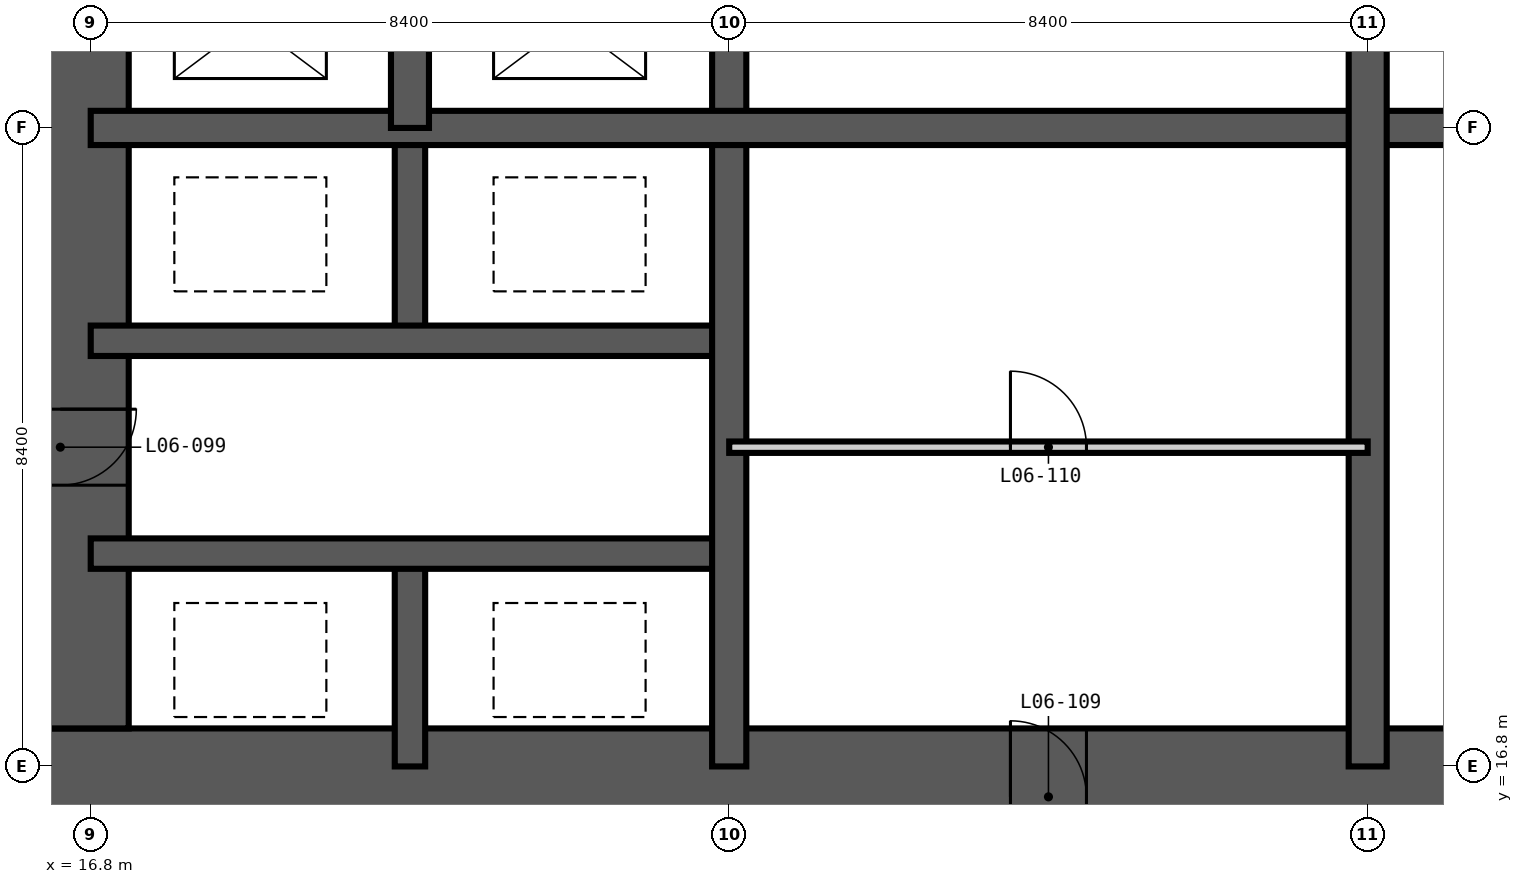
"""IFC4 building model, lengths in metres.
Left out: names, types, materials, properties, quantities, classifications, styles, units other than length and angle.
Written with IfcOpenShell. Run it as: python <this file> out.ifc"""

import sys

from ifc_helpers import new_model, si_unit, direction, frame, frame_2d, origin, place, context, subcontext, project, spatial, rectangle, extrude, element, fill, save


model = new_model("IFC4")
c1 = context("Model", 3, precision=1e-05, world=origin(), true_north=direction((0.0, 1.0)))
c2 = subcontext(c1, "Body", "Model", "MODEL_VIEW")
j1 = project(units=[si_unit("LENGTHUNIT", "METRE"), si_unit("PLANEANGLEUNIT", "RADIAN")], contexts=[c1])
p1 = place(None, origin())
s1 = spatial("IfcSite", under=j1, at=p1, CompositionType="ELEMENT")
p2 = place(p1, origin())
s2 = spatial("IfcBuilding", under=s1, at=p2, CompositionType="ELEMENT")
p3 = place(p2, frame((0.0, 0.0, 30.6)))
s3 = spatial("IfcBuildingStorey", under=s2, at=p3, CompositionType="ELEMENT", Elevation=30.6)
p4 = place(p3, frame((15.5, 16.4, -0.35), z_axis=(0.0, 0.0, 1.0), x_axis=(1.0, 0.0, 0.0)))
e1 = element("IfcWall", 1, at=p4, inside=s3, PredefinedType="SHEAR", context=c2, shape_type="SweptSolid", body=[
    extrude(rectangle(XDim=27.8, YDim=1.8, at=frame_2d((13.9, 0.0))), origin(), (0.0, 0.0, 1.0), 3.6),
])
p5 = place(p4, frame((13.4, 0.0, 0.35)))
e2 = element("IfcOpeningElement", 2, at=p5, cuts=e1, PredefinedType="OPENING", context=c2, shape_type="SweptSolid", body=[
    extrude(rectangle(XDim=1.0, YDim=2.1, at=frame_2d((0.5, 1.05))), frame((0.0, 0.91, 0.0), z_axis=(0.0, -1.0, 0.0), x_axis=(1.0, 0.0, 0.0)), (0.0, 0.0, 1.0), 1.82),
])
p6 = place(p4, frame((19.7, 0.0, 0.35)))
e3 = element("IfcOpeningElement", 3, at=p6, cuts=e1, PredefinedType="OPENING", context=c2, shape_type="SweptSolid", body=[
    extrude(rectangle(XDim=1.0, YDim=2.1, at=frame_2d((0.5, 1.05))), frame((0.0, 0.91, 0.0), z_axis=(0.0, -1.0, 0.0), x_axis=(1.0, 0.0, 0.0)), (0.0, 0.0, 1.0), 1.82),
])
p7 = place(p3, frame((16.4, 41.5, -0.35), z_axis=(0.0, 0.0, 1.0), x_axis=(0.0, -1.0, 0.0)))
e4 = element("IfcWall", 4, at=p7, inside=s3, PredefinedType="SHEAR", context=c2, shape_type="SweptSolid", body=[
    extrude(rectangle(XDim=24.2, YDim=1.8, at=frame_2d((12.1, 0.0))), origin(), (0.0, 0.0, 1.0), 3.6),
])
p8 = place(p7, frame((11.2, 0.0, 0.35)))
e5 = element("IfcOpeningElement", 5, at=p8, cuts=e4, PredefinedType="OPENING", context=c2, shape_type="SweptSolid", body=[
    extrude(rectangle(XDim=1.8, YDim=2.2, at=frame_2d((0.9, 1.1))), frame((0.0, 0.91, 0.0), z_axis=(0.0, -1.0, 0.0), x_axis=(1.0, 0.0, 0.0)), (0.0, 0.0, 1.0), 1.82),
])
p9 = place(p7, frame((20.0, 0.0, 0.35)))
e6 = element("IfcOpeningElement", 6, at=p9, cuts=e4, PredefinedType="OPENING", context=c2, shape_type="SweptSolid", body=[
    extrude(rectangle(XDim=1.0, YDim=2.1, at=frame_2d((0.5, 1.05))), frame((0.0, 0.91, 0.0), z_axis=(0.0, -1.0, 0.0), x_axis=(1.0, 0.0, 0.0)), (0.0, 0.0, 1.0), 1.82),
])
p10 = place(p7, frame((5.3, 0.0, 0.35)))
e7 = element("IfcOpeningElement", 7, at=p10, cuts=e4, PredefinedType="OPENING", context=c2, shape_type="SweptSolid", body=[
    extrude(rectangle(XDim=1.0, YDim=2.1, at=frame_2d((0.5, 1.05))), frame((0.0, 0.91, 0.0), z_axis=(0.0, -1.0, 0.0), x_axis=(1.0, 0.0, 0.0)), (0.0, 0.0, 1.0), 1.82),
])
for number, where, z_axis, x_axis in (
    (8, (21.0, 16.8, -0.35), (0.0, 0.0, 1.0), (0.0, 1.0, 0.0)),
    (9, (21.0, 22.4, -0.35), (0.0, 0.0, 1.0), (0.0, 1.0, 0.0)),
):
    element("IfcWall", number, at=place(p3, frame(where, z_axis=z_axis, x_axis=x_axis)), inside=s3, PredefinedType="SHEAR", context=c2, shape_type="SweptSolid", body=[
        extrude(rectangle(XDim=2.8, YDim=0.4, at=frame_2d((1.4, 0.0))), origin(), (0.0, 0.0, 1.0), 3.6),
    ])
for number, where, z_axis, x_axis in (
    (10, (16.8, 19.6, -0.35), (0.0, 0.0, 1.0), (1.0, 0.0, 0.0)),
    (11, (16.8, 22.4, -0.35), (0.0, 0.0, 1.0), (1.0, 0.0, 0.0)),
):
    element("IfcWall", number, at=place(p3, frame(where, z_axis=z_axis, x_axis=x_axis)), inside=s3, PredefinedType="SHEAR", context=c2, shape_type="SweptSolid", body=[
        extrude(rectangle(XDim=8.4, YDim=0.4, at=frame_2d((4.2, 0.0))), origin(), (0.0, 0.0, 1.0), 3.6),
    ])
for number, where, z_axis, x_axis in (
    (12, (25.2, 16.8, -0.35), (0.0, 0.0, 1.0), (0.0, 1.0, 0.0)),
    (13, (16.8, 25.2, -0.35), (0.0, 0.0, 1.0), (1.0, 0.0, 0.0)),
):
    element("IfcWall", number, at=place(p3, frame(where, z_axis=z_axis, x_axis=x_axis)), inside=s3, PredefinedType="SHEAR", context=c2, shape_type="SweptSolid", body=[
        extrude(rectangle(XDim=25.2, YDim=0.45, at=frame_2d((12.6, 0.0))), origin(), (0.0, 0.0, 1.0), 3.6),
    ])
p11 = place(p3, frame((21.0, 25.2, -0.35), z_axis=(0.0, 0.0, 1.0), x_axis=(0.0, 1.0, 0.0)))
e14 = element("IfcWall", 14, at=p11, inside=s3, PredefinedType="SHEAR", context=c2, shape_type="SweptSolid", body=[
    extrude(rectangle(XDim=2.8, YDim=0.5, at=frame_2d((1.4, 0.0))), origin(), (0.0, 0.0, 1.0), 3.6),
])
p12 = place(p3, frame((33.6, 16.8, -0.35), z_axis=(0.0, 0.0, 1.0), x_axis=(0.0, 1.0, 0.0)))
e15 = element("IfcWall", 15, at=p12, inside=s3, PredefinedType="SHEAR", context=c2, shape_type="SweptSolid", body=[
    extrude(rectangle(XDim=25.2, YDim=0.5, at=frame_2d((12.6, 0.0))), origin(), (0.0, 0.0, 1.0), 3.6),
])
p13 = place(p12, frame((22.5, 0.0, 0.35)))
e16 = element("IfcOpeningElement", 16, at=p13, cuts=e15, PredefinedType="OPENING", context=c2, shape_type="SweptSolid", body=[
    extrude(rectangle(XDim=1.2, YDim=2.2, at=frame_2d((0.6, 1.1))), frame((0.0, 0.26, 0.0), z_axis=(0.0, -1.0, 0.0), x_axis=(1.0, 0.0, 0.0)), (0.0, 0.0, 1.0), 0.52),
])
p14 = place(p12, frame((18.3, 0.0, 0.35)))
e17 = element("IfcOpeningElement", 17, at=p14, cuts=e15, PredefinedType="OPENING", context=c2, shape_type="SweptSolid", body=[
    extrude(rectangle(XDim=1.2, YDim=2.2, at=frame_2d((0.6, 1.1))), frame((0.0, 0.26, 0.0), z_axis=(0.0, -1.0, 0.0), x_axis=(1.0, 0.0, 0.0)), (0.0, 0.0, 1.0), 0.52),
])
p15 = place(p12, frame((12.1, 0.0, 0.35)))
e18 = element("IfcOpeningElement", 18, at=p15, cuts=e15, PredefinedType="OPENING", context=c2, shape_type="SweptSolid", body=[
    extrude(rectangle(XDim=1.0, YDim=2.1, at=frame_2d((0.5, 1.05))), frame((0.0, 0.26, 0.0), z_axis=(0.0, -1.0, 0.0), x_axis=(1.0, 0.0, 0.0)), (0.0, 0.0, 1.0), 0.52),
])
p16 = place(p3, frame((25.2, 21.0, 0.0), z_axis=(0.0, 0.0, 1.0), x_axis=(1.0, 0.0, 0.0)))
e19 = element("IfcWall", 19, at=p16, inside=s3, PredefinedType="PARTITIONING", context=c2, shape_type="SweptSolid", body=[
    extrude(rectangle(XDim=8.4, YDim=0.15, at=frame_2d((4.2, 0.0))), origin(), (0.0, 0.0, 1.0), 3.25),
])
p17 = place(p16, frame((3.7, 0.0, 0.0)))
e20 = element("IfcOpeningElement", 20, at=p17, cuts=e19, PredefinedType="OPENING", context=c2, shape_type="SweptSolid", body=[
    extrude(rectangle(XDim=1.0, YDim=2.1, at=frame_2d((0.5, 1.05))), frame((0.0, 0.085, 0.0), z_axis=(0.0, -1.0, 0.0), x_axis=(1.0, 0.0, 0.0)), (0.0, 0.0, 1.0), 0.17),
])
p18 = place(p9, origin())
e21 = element("IfcDoor", 21, at=p18, inside=s3, OperationType="SINGLE_SWING_LEFT", PredefinedType="DOOR", context=c2, shape_type="SweptSolid", body=[
    extrude(rectangle(XDim=1.0, YDim=2.1, at=frame_2d((0.5, 1.05))), frame((0.0, 0.025, 0.0), z_axis=(0.0, -1.0, 0.0), x_axis=(1.0, 0.0, 0.0)), (0.0, 0.0, 1.0), 0.05),
])
fill(e6, e21)
p19 = place(p5, origin())
e22 = element("IfcDoor", 22, at=p19, inside=s3, OperationType="SINGLE_SWING_LEFT", PredefinedType="DOOR", context=c2, shape_type="SweptSolid", body=[
    extrude(rectangle(XDim=1.0, YDim=2.1, at=frame_2d((0.5, 1.05))), frame((0.0, 0.025, 0.0), z_axis=(0.0, -1.0, 0.0), x_axis=(1.0, 0.0, 0.0)), (0.0, 0.0, 1.0), 0.05),
])
fill(e2, e22)
p20 = place(p17, origin())
e23 = element("IfcDoor", 23, at=p20, inside=s3, OperationType="SINGLE_SWING_LEFT", PredefinedType="DOOR", context=c2, shape_type="SweptSolid", body=[
    extrude(rectangle(XDim=1.0, YDim=2.1, at=frame_2d((0.5, 1.05))), frame((0.0, 0.025, 0.0), z_axis=(0.0, -1.0, 0.0), x_axis=(1.0, 0.0, 0.0)), (0.0, 0.0, 1.0), 0.05),
])
fill(e20, e23)
save(model, sys.argv[1])
